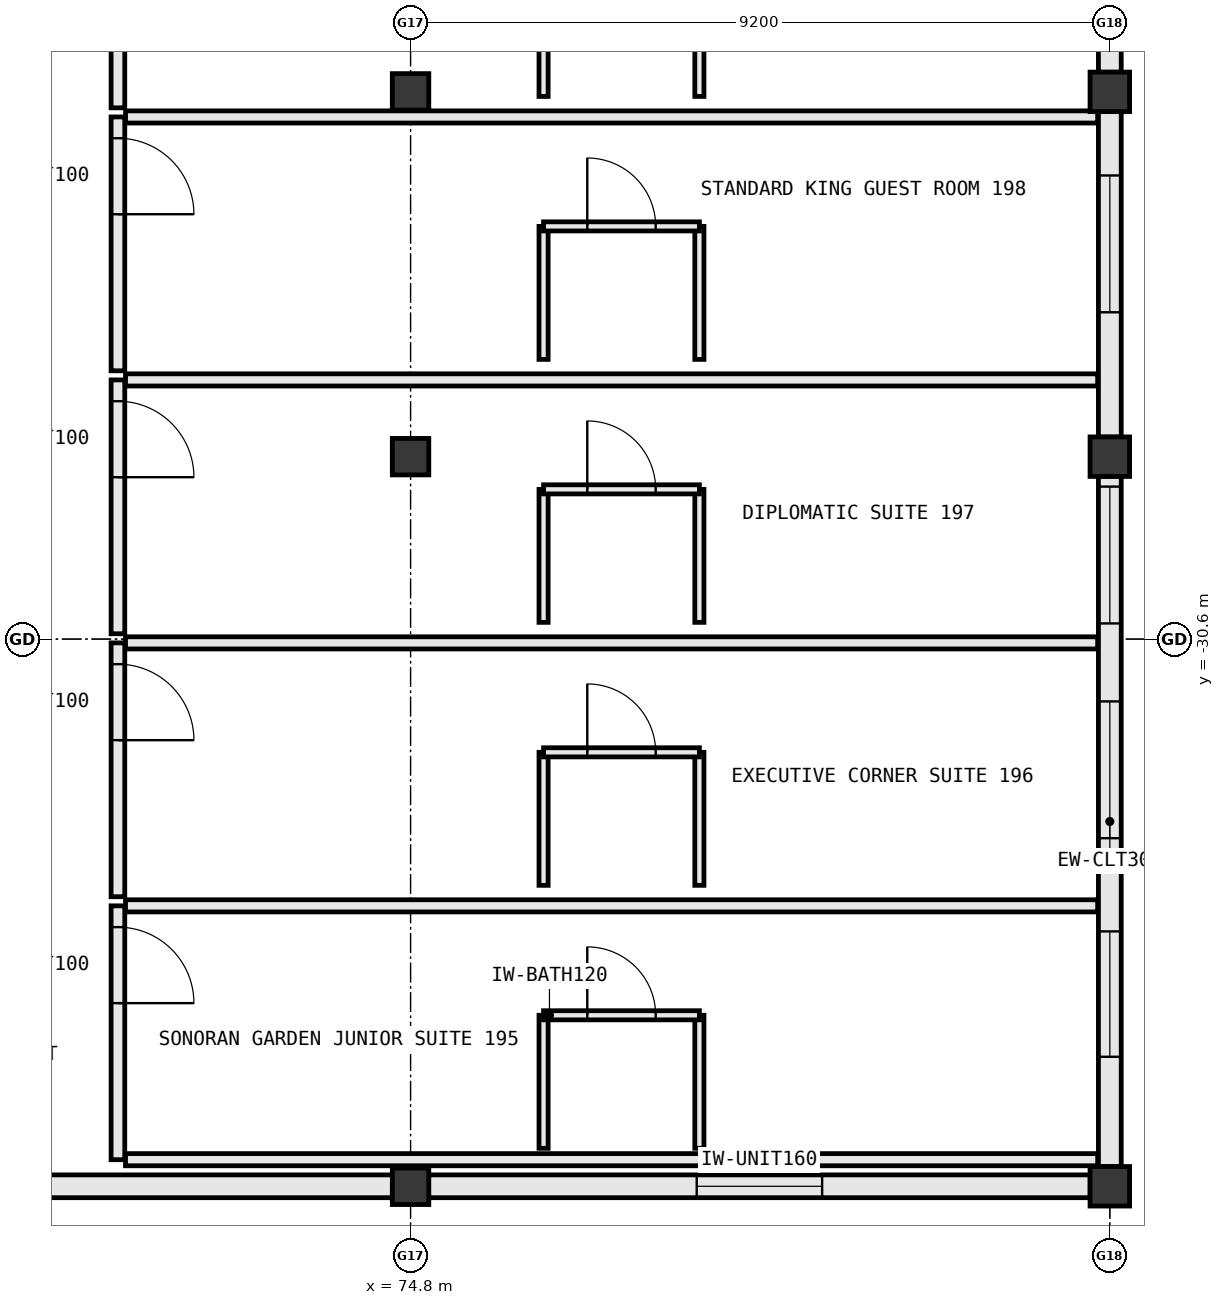
"""IFC4 building model, lengths in metres.
Left out: names, types, materials, properties, quantities, classifications, styles, units other than length and angle.
Written with IfcOpenShell. Run it as: python <this file> out.ifc"""

import sys

from ifc_helpers import new_model, si_unit, direction, frame, frame_2d, origin, origin_2d, place, context, subcontext, project, spatial, rectangle, extrude, element, fill, save


model = new_model("IFC4")
c1 = context("Model", 3, precision=1e-05, world=origin(), true_north=direction((0.0, 1.0)))
c2 = subcontext(c1, "Body", "Model", "MODEL_VIEW")
j1 = project(units=[si_unit("LENGTHUNIT", "METRE"), si_unit("PLANEANGLEUNIT", "RADIAN")], contexts=[c1])
p1 = place(None, origin())
s1 = spatial("IfcSite", under=j1, at=p1, CompositionType="ELEMENT")
p2 = place(p1, origin())
s2 = spatial("IfcBuilding", under=s1, at=p2, CompositionType="ELEMENT")
p3 = place(p2, frame((0.0, 0.0, 27.6)))
s3 = spatial("IfcBuildingStorey", under=s2, at=p3, CompositionType="ELEMENT", Elevation=27.6)
for number, where, z_axis, x_axis in (
    (1, (74.8, -37.8, 0.0), (0.0, 0.0, 1.0), (1.0, 0.0, 0.0)),
    (2, (74.8, -28.2, 0.0), (0.0, 0.0, 1.0), (1.0, 0.0, 0.0)),
    (3, (74.8, -23.4, 0.0), (0.0, 0.0, 1.0), (1.0, 0.0, 0.0)),
):
    element("IfcColumn", number, at=place(p3, frame(where, z_axis=z_axis, x_axis=x_axis)), inside=s3, PredefinedType="COLUMN", context=c2, shape_type="SweptSolid", body=[
        extrude(rectangle(XDim=0.48, YDim=0.48, at=origin_2d()), origin(), (0.0, 0.0, 1.0), 3.8),
    ])
for number, where, z_axis, x_axis in (
    (4, (84.0, -37.8, 0.0), (0.0, 0.0, 1.0), (1.0, 0.0, 0.0)),
    (5, (84.0, -28.2, 0.0), (0.0, 0.0, 1.0), (1.0, 0.0, 0.0)),
    (6, (84.0, -23.4, 0.0), (0.0, 0.0, 1.0), (1.0, 0.0, 0.0)),
):
    element("IfcColumn", number, at=place(p3, frame(where, z_axis=z_axis, x_axis=x_axis)), inside=s3, PredefinedType="COLUMN", context=c2, shape_type="SweptSolid", body=[
        extrude(rectangle(XDim=0.52, YDim=0.52, at=origin_2d()), origin(), (0.0, 0.0, 1.0), 3.8),
    ])
p4 = place(p3, frame((67.808, -37.8, 0.0), z_axis=(0.0, 0.0, 1.0), x_axis=(1.0, 0.0, 0.0)))
e7 = element("IfcWall", 7, at=p4, inside=s3, PredefinedType="STANDARD", context=c2, shape_type="SweptSolid", body=[
    extrude(rectangle(XDim=6.754, YDim=0.3, at=frame_2d((3.377, 0.0))), origin(), (0.0, 0.0, 1.0), 2.83),
])
p5 = place(p3, frame((75.038, -37.8, 0.0), z_axis=(0.0, 0.0, 1.0), x_axis=(1.0, 0.0, 0.0)))
e8 = element("IfcWall", 8, at=p5, inside=s3, PredefinedType="STANDARD", context=c2, shape_type="SweptSolid", body=[
    extrude(rectangle(XDim=8.704, YDim=0.3, at=frame_2d((4.352, 0.0))), origin(), (0.0, 0.0, 1.0), 2.93),
])
p6 = place(p5, frame((3.527, 0.0, 0.85)))
e9 = element("IfcOpeningElement", 9, at=p6, cuts=e8, PredefinedType="OPENING", context=c2, shape_type="SweptSolid", body=[
    extrude(rectangle(XDim=1.65, YDim=1.8, at=frame_2d((0.825, 0.9))), frame((0.0, 0.162, 0.0), z_axis=(0.0, -1.0, 0.0), x_axis=(1.0, 0.0, 0.0)), (0.0, 0.0, 1.0), 0.324),
])
p7 = place(p3, frame((84.0, -37.542, 0.0), z_axis=(0.0, 0.0, 1.0), x_axis=(0.0, 1.0, 0.0)))
e10 = element("IfcWall", 10, at=p7, inside=s3, PredefinedType="STANDARD", context=c2, shape_type="SweptSolid", body=[
    extrude(rectangle(XDim=9.084, YDim=0.3, at=frame_2d((4.542, 0.0))), origin(), (0.0, 0.0, 1.0), 2.97),
])
p8 = place(p7, frame((1.446, 0.0, 0.85)))
e11 = element("IfcOpeningElement", 11, at=p8, cuts=e10, PredefinedType="OPENING", context=c2, shape_type="SweptSolid", body=[
    extrude(rectangle(XDim=1.65, YDim=1.8, at=frame_2d((0.825, 0.9))), frame((0.0, 0.162, 0.0), z_axis=(0.0, -1.0, 0.0), x_axis=(1.0, 0.0, 0.0)), (0.0, 0.0, 1.0), 0.324),
])
p9 = place(p7, frame((4.322, 0.0, 0.85)))
e12 = element("IfcOpeningElement", 12, at=p9, cuts=e10, PredefinedType="OPENING", context=c2, shape_type="SweptSolid", body=[
    extrude(rectangle(XDim=1.8, YDim=1.85, at=frame_2d((0.9, 0.925))), frame((0.0, 0.162, 0.0), z_axis=(0.0, -1.0, 0.0), x_axis=(1.0, 0.0, 0.0)), (0.0, 0.0, 1.0), 0.324),
])
p10 = place(p7, frame((7.148, 0.0, 0.85)))
e13 = element("IfcOpeningElement", 13, at=p10, cuts=e10, PredefinedType="OPENING", context=c2, shape_type="SweptSolid", body=[
    extrude(rectangle(XDim=1.8, YDim=1.85, at=frame_2d((0.9, 0.925))), frame((0.0, 0.162, 0.0), z_axis=(0.0, -1.0, 0.0), x_axis=(1.0, 0.0, 0.0)), (0.0, 0.0, 1.0), 0.324),
])
p11 = place(p3, frame((84.0, -27.942, 0.0), z_axis=(0.0, 0.0, 1.0), x_axis=(0.0, 1.0, 0.0)))
e14 = element("IfcWall", 14, at=p11, inside=s3, PredefinedType="STANDARD", context=c2, shape_type="SweptSolid", body=[
    extrude(rectangle(XDim=4.284, YDim=0.3, at=frame_2d((2.142, 0.0))), origin(), (0.0, 0.0, 1.0), 2.97),
])
p12 = place(p11, frame((1.642, 0.0, 0.85)))
e15 = element("IfcOpeningElement", 15, at=p12, cuts=e14, PredefinedType="OPENING", context=c2, shape_type="SweptSolid", body=[
    extrude(rectangle(XDim=1.8, YDim=1.85, at=frame_2d((0.9, 0.925))), frame((0.0, 0.162, 0.0), z_axis=(0.0, -1.0, 0.0), x_axis=(1.0, 0.0, 0.0)), (0.0, 0.0, 1.0), 0.324),
])
p13 = place(p3, frame((84.0, -23.142, 0.0), z_axis=(0.0, 0.0, 1.0), x_axis=(0.0, 1.0, 0.0)))
e16 = element("IfcWall", 16, at=p13, inside=s3, PredefinedType="STANDARD", context=c2, shape_type="SweptSolid", body=[
    extrude(rectangle(XDim=4.284, YDim=0.3, at=frame_2d((2.142, 0.0))), origin(), (0.0, 0.0, 1.0), 2.97),
])
p14 = place(p13, frame((0.536, 0.0, 0.85)))
e17 = element("IfcOpeningElement", 17, at=p14, cuts=e16, PredefinedType="OPENING", context=c2, shape_type="SweptSolid", body=[
    extrude(rectangle(XDim=1.8, YDim=1.85, at=frame_2d((0.9, 0.925))), frame((0.0, 0.162, 0.0), z_axis=(0.0, -1.0, 0.0), x_axis=(1.0, 0.0, 0.0)), (0.0, 0.0, 1.0), 0.324),
])
p15 = place(p3, frame((70.95, -34.11, 0.0), z_axis=(0.0, 0.0, 1.0), x_axis=(0.0, -1.0, 0.0)))
e18 = element("IfcWall", 18, at=p15, inside=s3, PredefinedType="PARTITIONING", context=c2, shape_type="SweptSolid", body=[
    extrude(rectangle(XDim=3.34, YDim=0.18, at=frame_2d((1.67, 0.0))), origin(), (0.0, 0.0, 1.0), 3.555),
])
p16 = place(p15, frame((0.28, 0.0, 0.0)))
e19 = element("IfcOpeningElement", 19, at=p16, cuts=e18, PredefinedType="OPENING", context=c2, shape_type="SweptSolid", body=[
    extrude(rectangle(XDim=1.0, YDim=2.2, at=frame_2d((0.5, 1.1))), frame((0.0, 0.102, 0.0), z_axis=(0.0, -1.0, 0.0), x_axis=(1.0, 0.0, 0.0)), (0.0, 0.0, 1.0), 0.204),
])
p17 = place(p3, frame((71.05, -37.45, 0.0), z_axis=(0.0, 0.0, 1.0), x_axis=(1.0, 0.0, 0.0)))
e20 = element("IfcWall", 20, at=p17, inside=s3, PredefinedType="PARTITIONING", context=c2, shape_type="SweptSolid", body=[
    extrude(rectangle(XDim=12.79, YDim=0.16, at=frame_2d((6.395, 0.0))), origin(), (0.0, 0.0, 1.0), 2.83),
])
p18 = place(p3, frame((71.05, -34.11, 0.0), z_axis=(0.0, 0.0, 1.0), x_axis=(1.0, 0.0, 0.0)))
e21 = element("IfcWall", 21, at=p18, inside=s3, PredefinedType="PARTITIONING", context=c2, shape_type="SweptSolid", body=[
    extrude(rectangle(XDim=12.79, YDim=0.16, at=frame_2d((6.395, 0.0))), origin(), (0.0, 0.0, 1.0), 3.555),
])
for number, where, z_axis, x_axis in (
    (22, (76.55, -37.3, 0.0), (0.0, 0.0, 1.0), (0.0, 1.0, 0.0)),
    (23, (78.6, -37.3, 0.0), (0.0, 0.0, 1.0), (0.0, 1.0, 0.0)),
):
    element("IfcWall", number, at=place(p3, frame(where, z_axis=z_axis, x_axis=x_axis)), inside=s3, PredefinedType="PARTITIONING", context=c2, shape_type="SweptSolid", body=[
        extrude(rectangle(XDim=1.75, YDim=0.12, at=frame_2d((0.875, 0.0))), origin(), (0.0, 0.0, 1.0), 3.555),
    ])
p19 = place(p3, frame((76.55, -35.55, 0.0), z_axis=(0.0, 0.0, 1.0), x_axis=(1.0, 0.0, 0.0)))
e24 = element("IfcWall", 24, at=p19, inside=s3, PredefinedType="PARTITIONING", context=c2, shape_type="SweptSolid", body=[
    extrude(rectangle(XDim=2.05, YDim=0.12, at=frame_2d((1.025, 0.0))), origin(), (0.0, 0.0, 1.0), 3.555),
])
p20 = place(p19, frame((0.575, 0.0, 0.0)))
e25 = element("IfcOpeningElement", 25, at=p20, cuts=e24, PredefinedType="OPENING", context=c2, shape_type="SweptSolid", body=[
    extrude(rectangle(XDim=0.9, YDim=2.15, at=frame_2d((0.45, 1.075))), frame((0.0, 0.072, 0.0), z_axis=(0.0, -1.0, 0.0), x_axis=(1.0, 0.0, 0.0)), (0.0, 0.0, 1.0), 0.144),
])
p21 = place(p3, frame((70.95, -30.65, 0.0), z_axis=(0.0, 0.0, 1.0), x_axis=(0.0, -1.0, 0.0)))
e26 = element("IfcWall", 26, at=p21, inside=s3, PredefinedType="PARTITIONING", context=c2, shape_type="SweptSolid", body=[
    extrude(rectangle(XDim=3.34, YDim=0.18, at=frame_2d((1.67, 0.0))), origin(), (0.0, 0.0, 1.0), 3.555),
])
p22 = place(p21, frame((0.28, 0.0, 0.0)))
e27 = element("IfcOpeningElement", 27, at=p22, cuts=e26, PredefinedType="OPENING", context=c2, shape_type="SweptSolid", body=[
    extrude(rectangle(XDim=1.0, YDim=2.2, at=frame_2d((0.5, 1.1))), frame((0.0, 0.102, 0.0), z_axis=(0.0, -1.0, 0.0), x_axis=(1.0, 0.0, 0.0)), (0.0, 0.0, 1.0), 0.204),
])
p23 = place(p3, frame((71.05, -30.65, 0.0), z_axis=(0.0, 0.0, 1.0), x_axis=(1.0, 0.0, 0.0)))
e28 = element("IfcWall", 28, at=p23, inside=s3, PredefinedType="PARTITIONING", context=c2, shape_type="SweptSolid", body=[
    extrude(rectangle(XDim=12.79, YDim=0.16, at=frame_2d((6.395, 0.0))), origin(), (0.0, 0.0, 1.0), 3.555),
])
for number, where, z_axis, x_axis in (
    (29, (76.55, -33.84, 0.0), (0.0, 0.0, 1.0), (0.0, 1.0, 0.0)),
    (30, (78.6, -33.84, 0.0), (0.0, 0.0, 1.0), (0.0, 1.0, 0.0)),
):
    element("IfcWall", number, at=place(p3, frame(where, z_axis=z_axis, x_axis=x_axis)), inside=s3, PredefinedType="PARTITIONING", context=c2, shape_type="SweptSolid", body=[
        extrude(rectangle(XDim=1.75, YDim=0.12, at=frame_2d((0.875, 0.0))), origin(), (0.0, 0.0, 1.0), 3.555),
    ])
p24 = place(p3, frame((76.55, -32.09, 0.0), z_axis=(0.0, 0.0, 1.0), x_axis=(1.0, 0.0, 0.0)))
e31 = element("IfcWall", 31, at=p24, inside=s3, PredefinedType="PARTITIONING", context=c2, shape_type="SweptSolid", body=[
    extrude(rectangle(XDim=2.05, YDim=0.12, at=frame_2d((1.025, 0.0))), origin(), (0.0, 0.0, 1.0), 3.555),
])
p25 = place(p24, frame((0.575, 0.0, 0.0)))
e32 = element("IfcOpeningElement", 32, at=p25, cuts=e31, PredefinedType="OPENING", context=c2, shape_type="SweptSolid", body=[
    extrude(rectangle(XDim=0.9, YDim=2.15, at=frame_2d((0.45, 1.075))), frame((0.0, 0.072, 0.0), z_axis=(0.0, -1.0, 0.0), x_axis=(1.0, 0.0, 0.0)), (0.0, 0.0, 1.0), 0.144),
])
p26 = place(p3, frame((70.95, -27.19, 0.0), z_axis=(0.0, 0.0, 1.0), x_axis=(0.0, -1.0, 0.0)))
e33 = element("IfcWall", 33, at=p26, inside=s3, PredefinedType="PARTITIONING", context=c2, shape_type="SweptSolid", body=[
    extrude(rectangle(XDim=3.34, YDim=0.18, at=frame_2d((1.67, 0.0))), origin(), (0.0, 0.0, 1.0), 3.555),
])
p27 = place(p26, frame((0.28, 0.0, 0.0)))
e34 = element("IfcOpeningElement", 34, at=p27, cuts=e33, PredefinedType="OPENING", context=c2, shape_type="SweptSolid", body=[
    extrude(rectangle(XDim=1.0, YDim=2.2, at=frame_2d((0.5, 1.1))), frame((0.0, 0.102, 0.0), z_axis=(0.0, -1.0, 0.0), x_axis=(1.0, 0.0, 0.0)), (0.0, 0.0, 1.0), 0.204),
])
p28 = place(p3, frame((71.05, -27.19, 0.0), z_axis=(0.0, 0.0, 1.0), x_axis=(1.0, 0.0, 0.0)))
e35 = element("IfcWall", 35, at=p28, inside=s3, PredefinedType="PARTITIONING", context=c2, shape_type="SweptSolid", body=[
    extrude(rectangle(XDim=12.79, YDim=0.16, at=frame_2d((6.395, 0.0))), origin(), (0.0, 0.0, 1.0), 3.555),
])
for number, where, z_axis, x_axis in (
    (36, (76.55, -30.38, 0.0), (0.0, 0.0, 1.0), (0.0, 1.0, 0.0)),
    (37, (78.6, -30.38, 0.0), (0.0, 0.0, 1.0), (0.0, 1.0, 0.0)),
):
    element("IfcWall", number, at=place(p3, frame(where, z_axis=z_axis, x_axis=x_axis)), inside=s3, PredefinedType="PARTITIONING", context=c2, shape_type="SweptSolid", body=[
        extrude(rectangle(XDim=1.75, YDim=0.12, at=frame_2d((0.875, 0.0))), origin(), (0.0, 0.0, 1.0), 3.555),
    ])
p29 = place(p3, frame((76.55, -28.63, 0.0), z_axis=(0.0, 0.0, 1.0), x_axis=(1.0, 0.0, 0.0)))
e38 = element("IfcWall", 38, at=p29, inside=s3, PredefinedType="PARTITIONING", context=c2, shape_type="SweptSolid", body=[
    extrude(rectangle(XDim=2.05, YDim=0.12, at=frame_2d((1.025, 0.0))), origin(), (0.0, 0.0, 1.0), 3.555),
])
p30 = place(p29, frame((0.575, 0.0, 0.0)))
e39 = element("IfcOpeningElement", 39, at=p30, cuts=e38, PredefinedType="OPENING", context=c2, shape_type="SweptSolid", body=[
    extrude(rectangle(XDim=0.9, YDim=2.15, at=frame_2d((0.45, 1.075))), frame((0.0, 0.072, 0.0), z_axis=(0.0, -1.0, 0.0), x_axis=(1.0, 0.0, 0.0)), (0.0, 0.0, 1.0), 0.144),
])
p31 = place(p3, frame((70.95, -23.73, 0.0), z_axis=(0.0, 0.0, 1.0), x_axis=(0.0, -1.0, 0.0)))
e40 = element("IfcWall", 40, at=p31, inside=s3, PredefinedType="PARTITIONING", context=c2, shape_type="SweptSolid", body=[
    extrude(rectangle(XDim=3.34, YDim=0.18, at=frame_2d((1.67, 0.0))), origin(), (0.0, 0.0, 1.0), 3.555),
])
p32 = place(p31, frame((0.28, 0.0, 0.0)))
e41 = element("IfcOpeningElement", 41, at=p32, cuts=e40, PredefinedType="OPENING", context=c2, shape_type="SweptSolid", body=[
    extrude(rectangle(XDim=1.0, YDim=2.2, at=frame_2d((0.5, 1.1))), frame((0.0, 0.102, 0.0), z_axis=(0.0, -1.0, 0.0), x_axis=(1.0, 0.0, 0.0)), (0.0, 0.0, 1.0), 0.204),
])
p33 = place(p3, frame((71.05, -23.73, 0.0), z_axis=(0.0, 0.0, 1.0), x_axis=(1.0, 0.0, 0.0)))
e42 = element("IfcWall", 42, at=p33, inside=s3, PredefinedType="PARTITIONING", context=c2, shape_type="SweptSolid", body=[
    extrude(rectangle(XDim=12.79, YDim=0.16, at=frame_2d((6.395, 0.0))), origin(), (0.0, 0.0, 1.0), 2.83),
])
for number, where, z_axis, x_axis in (
    (43, (76.55, -26.92, 0.0), (0.0, 0.0, 1.0), (0.0, 1.0, 0.0)),
    (44, (78.6, -26.92, 0.0), (0.0, 0.0, 1.0), (0.0, 1.0, 0.0)),
):
    element("IfcWall", number, at=place(p3, frame(where, z_axis=z_axis, x_axis=x_axis)), inside=s3, PredefinedType="PARTITIONING", context=c2, shape_type="SweptSolid", body=[
        extrude(rectangle(XDim=1.75, YDim=0.12, at=frame_2d((0.875, 0.0))), origin(), (0.0, 0.0, 1.0), 3.555),
    ])
p34 = place(p3, frame((76.55, -25.17, 0.0), z_axis=(0.0, 0.0, 1.0), x_axis=(1.0, 0.0, 0.0)))
e45 = element("IfcWall", 45, at=p34, inside=s3, PredefinedType="PARTITIONING", context=c2, shape_type="SweptSolid", body=[
    extrude(rectangle(XDim=2.05, YDim=0.12, at=frame_2d((1.025, 0.0))), origin(), (0.0, 0.0, 1.0), 3.555),
])
p35 = place(p34, frame((0.575, 0.0, 0.0)))
e46 = element("IfcOpeningElement", 46, at=p35, cuts=e45, PredefinedType="OPENING", context=c2, shape_type="SweptSolid", body=[
    extrude(rectangle(XDim=0.9, YDim=2.15, at=frame_2d((0.45, 1.075))), frame((0.0, 0.072, 0.0), z_axis=(0.0, -1.0, 0.0), x_axis=(1.0, 0.0, 0.0)), (0.0, 0.0, 1.0), 0.144),
])
p36 = place(p3, frame((70.95, -20.27, 0.0), z_axis=(0.0, 0.0, 1.0), x_axis=(0.0, -1.0, 0.0)))
e47 = element("IfcWall", 47, at=p36, inside=s3, PredefinedType="PARTITIONING", context=c2, shape_type="SweptSolid", body=[
    extrude(rectangle(XDim=3.34, YDim=0.18, at=frame_2d((1.67, 0.0))), origin(), (0.0, 0.0, 1.0), 3.555),
])
p37 = place(p36, frame((0.28, 0.0, 0.0)))
e48 = element("IfcOpeningElement", 48, at=p37, cuts=e47, PredefinedType="OPENING", context=c2, shape_type="SweptSolid", body=[
    extrude(rectangle(XDim=1.0, YDim=2.2, at=frame_2d((0.5, 1.1))), frame((0.0, 0.102, 0.0), z_axis=(0.0, -1.0, 0.0), x_axis=(1.0, 0.0, 0.0)), (0.0, 0.0, 1.0), 0.204),
])
for number, where, z_axis, x_axis in (
    (49, (76.55, -23.46, 0.0), (0.0, 0.0, 1.0), (0.0, 1.0, 0.0)),
    (50, (78.6, -23.46, 0.0), (0.0, 0.0, 1.0), (0.0, 1.0, 0.0)),
):
    element("IfcWall", number, at=place(p3, frame(where, z_axis=z_axis, x_axis=x_axis)), inside=s3, PredefinedType="PARTITIONING", context=c2, shape_type="SweptSolid", body=[
        extrude(rectangle(XDim=1.75, YDim=0.12, at=frame_2d((0.875, 0.0))), origin(), (0.0, 0.0, 1.0), 3.555),
    ])
p38 = place(p6, origin())
e51 = element("IfcWindow", 51, at=p38, inside=s3, PartitioningType="SINGLE_PANEL", PredefinedType="WINDOW", context=c2, shape_type="SweptSolid", body=[
    extrude(rectangle(XDim=1.65, YDim=1.8, at=frame_2d((0.825, 0.9))), frame((0.0, 0.03, 0.0), z_axis=(0.0, -1.0, 0.0), x_axis=(1.0, 0.0, 0.0)), (0.0, 0.0, 1.0), 0.06),
])
fill(e9, e51)
p39 = place(p8, origin())
e52 = element("IfcWindow", 52, at=p39, inside=s3, PartitioningType="SINGLE_PANEL", PredefinedType="WINDOW", context=c2, shape_type="SweptSolid", body=[
    extrude(rectangle(XDim=1.65, YDim=1.8, at=frame_2d((0.825, 0.9))), frame((0.0, 0.03, 0.0), z_axis=(0.0, -1.0, 0.0), x_axis=(1.0, 0.0, 0.0)), (0.0, 0.0, 1.0), 0.06),
])
fill(e11, e52)
p40 = place(p9, origin())
e53 = element("IfcWindow", 53, at=p40, inside=s3, PartitioningType="SINGLE_PANEL", PredefinedType="WINDOW", context=c2, shape_type="SweptSolid", body=[
    extrude(rectangle(XDim=1.8, YDim=1.85, at=frame_2d((0.9, 0.925))), frame((0.0, 0.03, 0.0), z_axis=(0.0, -1.0, 0.0), x_axis=(1.0, 0.0, 0.0)), (0.0, 0.0, 1.0), 0.06),
])
fill(e12, e53)
p41 = place(p10, origin())
e54 = element("IfcWindow", 54, at=p41, inside=s3, PartitioningType="SINGLE_PANEL", PredefinedType="WINDOW", context=c2, shape_type="SweptSolid", body=[
    extrude(rectangle(XDim=1.8, YDim=1.85, at=frame_2d((0.9, 0.925))), frame((0.0, 0.03, 0.0), z_axis=(0.0, -1.0, 0.0), x_axis=(1.0, 0.0, 0.0)), (0.0, 0.0, 1.0), 0.06),
])
fill(e13, e54)
p42 = place(p12, origin())
e55 = element("IfcWindow", 55, at=p42, inside=s3, PartitioningType="SINGLE_PANEL", PredefinedType="WINDOW", context=c2, shape_type="SweptSolid", body=[
    extrude(rectangle(XDim=1.8, YDim=1.85, at=frame_2d((0.9, 0.925))), frame((0.0, 0.03, 0.0), z_axis=(0.0, -1.0, 0.0), x_axis=(1.0, 0.0, 0.0)), (0.0, 0.0, 1.0), 0.06),
])
fill(e15, e55)
p43 = place(p16, origin())
e56 = element("IfcDoor", 56, at=p43, inside=s3, OperationType="SINGLE_SWING_RIGHT", PredefinedType="DOOR", context=c2, shape_type="SweptSolid", body=[
    extrude(rectangle(XDim=1.0, YDim=2.2, at=frame_2d((0.5, 1.1))), frame((0.0, 0.025, 0.0), z_axis=(0.0, -1.0, 0.0), x_axis=(1.0, 0.0, 0.0)), (0.0, 0.0, 1.0), 0.05),
])
fill(e19, e56)
p44 = place(p20, origin())
e57 = element("IfcDoor", 57, at=p44, inside=s3, OperationType="SINGLE_SWING_LEFT", PredefinedType="DOOR", context=c2, shape_type="SweptSolid", body=[
    extrude(rectangle(XDim=0.9, YDim=2.15, at=frame_2d((0.45, 1.075))), frame((0.0, 0.025, 0.0), z_axis=(0.0, -1.0, 0.0), x_axis=(1.0, 0.0, 0.0)), (0.0, 0.0, 1.0), 0.05),
])
fill(e25, e57)
p45 = place(p22, origin())
e58 = element("IfcDoor", 58, at=p45, inside=s3, OperationType="SINGLE_SWING_RIGHT", PredefinedType="DOOR", context=c2, shape_type="SweptSolid", body=[
    extrude(rectangle(XDim=1.0, YDim=2.2, at=frame_2d((0.5, 1.1))), frame((0.0, 0.025, 0.0), z_axis=(0.0, -1.0, 0.0), x_axis=(1.0, 0.0, 0.0)), (0.0, 0.0, 1.0), 0.05),
])
fill(e27, e58)
p46 = place(p25, origin())
e59 = element("IfcDoor", 59, at=p46, inside=s3, OperationType="SINGLE_SWING_LEFT", PredefinedType="DOOR", context=c2, shape_type="SweptSolid", body=[
    extrude(rectangle(XDim=0.9, YDim=2.15, at=frame_2d((0.45, 1.075))), frame((0.0, 0.025, 0.0), z_axis=(0.0, -1.0, 0.0), x_axis=(1.0, 0.0, 0.0)), (0.0, 0.0, 1.0), 0.05),
])
fill(e32, e59)
p47 = place(p27, origin())
e60 = element("IfcDoor", 60, at=p47, inside=s3, OperationType="SINGLE_SWING_RIGHT", PredefinedType="DOOR", context=c2, shape_type="SweptSolid", body=[
    extrude(rectangle(XDim=1.0, YDim=2.2, at=frame_2d((0.5, 1.1))), frame((0.0, 0.025, 0.0), z_axis=(0.0, -1.0, 0.0), x_axis=(1.0, 0.0, 0.0)), (0.0, 0.0, 1.0), 0.05),
])
fill(e34, e60)
p48 = place(p30, origin())
e61 = element("IfcDoor", 61, at=p48, inside=s3, OperationType="SINGLE_SWING_LEFT", PredefinedType="DOOR", context=c2, shape_type="SweptSolid", body=[
    extrude(rectangle(XDim=0.9, YDim=2.15, at=frame_2d((0.45, 1.075))), frame((0.0, 0.025, 0.0), z_axis=(0.0, -1.0, 0.0), x_axis=(1.0, 0.0, 0.0)), (0.0, 0.0, 1.0), 0.05),
])
fill(e39, e61)
p49 = place(p32, origin())
e62 = element("IfcDoor", 62, at=p49, inside=s3, OperationType="SINGLE_SWING_RIGHT", PredefinedType="DOOR", context=c2, shape_type="SweptSolid", body=[
    extrude(rectangle(XDim=1.0, YDim=2.2, at=frame_2d((0.5, 1.1))), frame((0.0, 0.025, 0.0), z_axis=(0.0, -1.0, 0.0), x_axis=(1.0, 0.0, 0.0)), (0.0, 0.0, 1.0), 0.05),
])
fill(e41, e62)
p50 = place(p35, origin())
e63 = element("IfcDoor", 63, at=p50, inside=s3, OperationType="SINGLE_SWING_LEFT", PredefinedType="DOOR", context=c2, shape_type="SweptSolid", body=[
    extrude(rectangle(XDim=0.9, YDim=2.15, at=frame_2d((0.45, 1.075))), frame((0.0, 0.025, 0.0), z_axis=(0.0, -1.0, 0.0), x_axis=(1.0, 0.0, 0.0)), (0.0, 0.0, 1.0), 0.05),
])
fill(e46, e63)
save(model, sys.argv[1])
